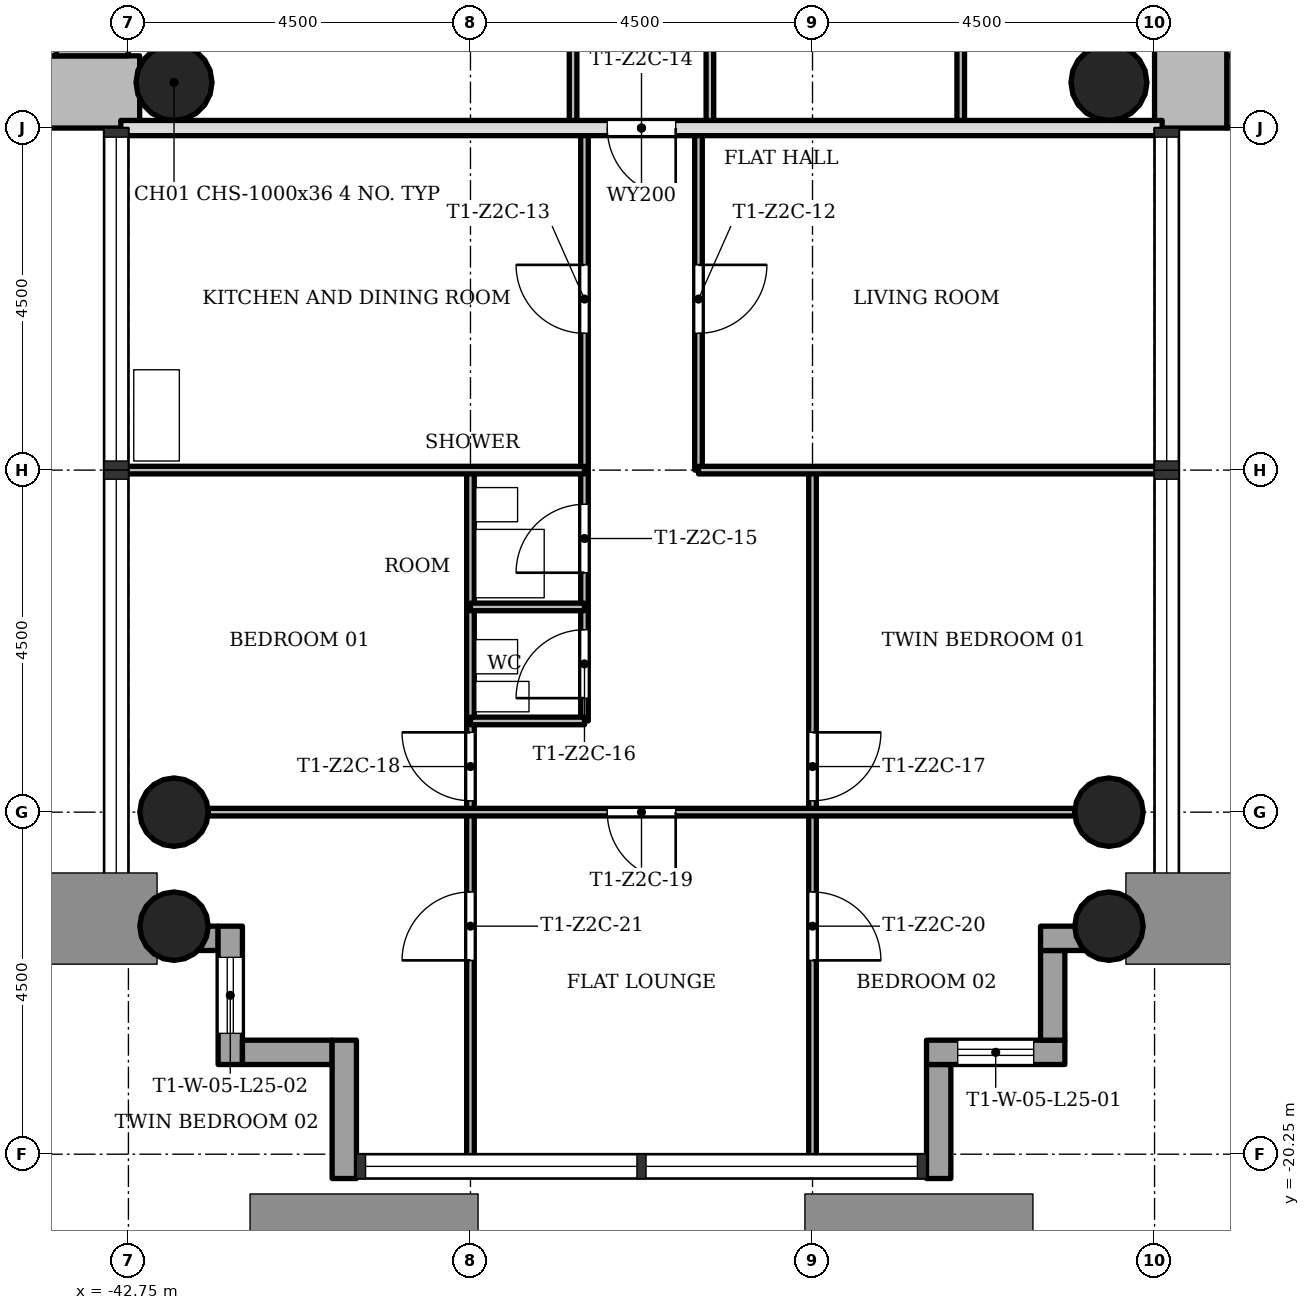
"""IFC4 building model, lengths in metres.
Left out: names, types, materials, properties, quantities, classifications, styles, units other than length and angle.
Written with IfcOpenShell. Run it as: python <this file> out.ifc"""

import sys

from ifc_helpers import new_model, si_unit, direction, frame, frame_2d, origin, origin_2d, place, context, subcontext, project, spatial, rectangle, hollow_circle, extrude, element, fill, save


model = new_model("IFC4")
c1 = context("Model", 3, precision=1e-05, world=origin(), true_north=direction((0.0, 1.0)))
c2 = subcontext(c1, "Body", "Model", "MODEL_VIEW")
j1 = project(units=[si_unit("LENGTHUNIT", "METRE"), si_unit("PLANEANGLEUNIT", "RADIAN")], contexts=[c1])
p1 = place(None, origin())
s1 = spatial("IfcSite", under=j1, at=p1, CompositionType="ELEMENT")
p2 = place(p1, origin())
s2 = spatial("IfcBuilding", under=s1, at=p2, CompositionType="ELEMENT")
p3 = place(p2, frame((0.0, 0.0, 93.6)))
s3 = spatial("IfcBuildingStorey", under=s2, at=p3, CompositionType="ELEMENT", Elevation=93.6)
p4 = place(p3, frame((-28.3, -6.275, 0.0), z_axis=(0.0, 0.0, 1.0), x_axis=(1.0, 0.0, 0.0)))
e1 = element("IfcWall", 1, at=p4, inside=s3, PredefinedType="SHEAR", context=c2, shape_type="SweptSolid", body=[
    extrude(rectangle(XDim=8.05, YDim=0.95, at=frame_2d((4.025, 0.0))), origin(), (0.0, 0.0, 1.0), 3.4),
])
p5 = place(p3, frame((-28.775, 5.8, 0.0), z_axis=(0.0, 0.0, 1.0), x_axis=(0.0, -1.0, 0.0)))
e2 = element("IfcWall", 2, at=p5, inside=s3, PredefinedType="SHEAR", context=c2, shape_type="SweptSolid", body=[
    extrude(rectangle(XDim=12.55, YDim=0.95, at=frame_2d((6.275, 0.0))), origin(), (0.0, 0.0, 1.0), 3.4),
])
p6 = place(p5, frame((4.9, 0.0, 0.0)))
e3 = element("IfcOpeningElement", 3, at=p6, cuts=e2, PredefinedType="OPENING", context=c2, shape_type="SweptSolid", body=[
    extrude(rectangle(XDim=1.8, YDim=2.1, at=frame_2d((0.9, 1.05))), frame((0.0, 0.485, 0.0), z_axis=(0.0, -1.0, 0.0), x_axis=(1.0, 0.0, 0.0)), (0.0, 0.0, 1.0), 0.97),
])
p7 = place(p3, frame((-51.298, -6.275, 0.0), z_axis=(0.0, 0.0, 1.0), x_axis=(1.0, 0.0, 0.0)))
e4 = element("IfcWall", 4, at=p7, inside=s3, PredefinedType="SHEAR", context=c2, shape_type="SweptSolid", body=[
    extrude(rectangle(XDim=8.696, YDim=0.95, at=frame_2d((4.348, 0.0))), origin(), (0.0, 0.0, 1.0), 3.4),
])
p8 = place(p3, frame((-43.225, -5.8, 0.0), z_axis=(0.0, 0.0, 1.0), x_axis=(0.0, 1.0, 0.0)))
e5 = element("IfcWall", 5, at=p8, inside=s3, PredefinedType="SHEAR", context=c2, shape_type="SweptSolid", body=[
    extrude(rectangle(XDim=12.55, YDim=0.95, at=frame_2d((6.275, 0.0))), origin(), (0.0, 0.0, 1.0), 3.4),
])
p9 = place(p8, frame((4.9, 0.0, 0.0)))
e6 = element("IfcOpeningElement", 6, at=p9, cuts=e5, PredefinedType="OPENING", context=c2, shape_type="SweptSolid", body=[
    extrude(rectangle(XDim=1.8, YDim=2.1, at=frame_2d((0.9, 1.05))), frame((0.0, 0.485, 0.0), z_axis=(0.0, -1.0, 0.0), x_axis=(1.0, 0.0, 0.0)), (0.0, 0.0, 1.0), 0.97),
])
for number, where, z_axis, x_axis in (
    (7, (-42.15, -15.75, 0.0), (0.0, 0.0, 1.0), (1.0, 0.0, 0.0)),
    (8, (-29.85, -15.75, 0.0), (0.0, 0.0, 1.0), (1.0, 0.0, 0.0)),
    (9, (-42.15, -17.25, 0.0), (0.0, 0.0, 1.0), (1.0, 0.0, 0.0)),
    (10, (-29.85, -17.25, 0.0), (0.0, 0.0, 1.0), (1.0, 0.0, 0.0)),
):
    element("IfcColumn", number, at=place(p3, frame(where, z_axis=z_axis, x_axis=x_axis)), inside=s3, PredefinedType="COLUMN", context=c2, shape_type="SweptSolid", body=[
        extrude(hollow_circle(Radius=0.45, WallThickness=0.032, at=origin_2d()), origin(), (0.0, 0.0, 1.0), 3.4),
    ])
for number, where, z_axis, x_axis in (
    (11, (-42.15, -6.15, 0.0), (0.0, 0.0, 1.0), (1.0, 0.0, 0.0)),
    (12, (-29.85, -6.15, 0.0), (0.0, 0.0, 1.0), (1.0, 0.0, 0.0)),
):
    element("IfcColumn", number, at=place(p3, frame(where, z_axis=z_axis, x_axis=x_axis)), inside=s3, PredefinedType="COLUMN", context=c2, shape_type="SweptSolid", body=[
        extrude(hollow_circle(Radius=0.5, WallThickness=0.036, at=origin_2d()), origin(), (0.0, 0.0, 1.0), 3.4),
    ])
p10 = place(p3, frame((-43.07, -17.41, -0.3), z_axis=(0.0, 0.0, 1.0), x_axis=(1.0, 0.0, 0.0)))
e13 = element("IfcWall", 13, at=p10, inside=s3, PredefinedType="STANDARD", context=c2, shape_type="SweptSolid", body=[
    extrude(rectangle(XDim=1.5, YDim=0.32, at=frame_2d((0.75, 0.0))), origin(), (0.0, 0.0, 1.0), 3.4),
])
p11 = place(p3, frame((-41.41, -17.25, -0.3), z_axis=(0.0, 0.0, 1.0), x_axis=(0.0, -1.0, 0.0)))
e14 = element("IfcWall", 14, at=p11, inside=s3, PredefinedType="STANDARD", context=c2, shape_type="SweptSolid", body=[
    extrude(rectangle(XDim=1.82, YDim=0.32, at=frame_2d((0.91, 0.0))), origin(), (0.0, 0.0, 1.0), 3.4),
])
p12 = place(p11, frame((0.41, 0.0, 1.2)))
e15 = element("IfcOpeningElement", 15, at=p12, cuts=e14, PredefinedType="OPENING", context=c2, shape_type="SweptSolid", body=[
    extrude(rectangle(XDim=1.0, YDim=1.5, at=frame_2d((0.5, 0.75))), frame((0.0, 0.17, 0.0), z_axis=(0.0, -1.0, 0.0), x_axis=(1.0, 0.0, 0.0)), (0.0, 0.0, 1.0), 0.34),
])
p13 = place(p3, frame((-41.25, -18.91, -0.3), z_axis=(0.0, 0.0, 1.0), x_axis=(1.0, 0.0, 0.0)))
e16 = element("IfcWall", 16, at=p13, inside=s3, PredefinedType="STANDARD", context=c2, shape_type="SweptSolid", body=[
    extrude(rectangle(XDim=1.18, YDim=0.32, at=frame_2d((0.59, 0.0))), origin(), (0.0, 0.0, 1.0), 3.4),
])
p14 = place(p3, frame((-39.91, -18.75, -0.3), z_axis=(0.0, 0.0, 1.0), x_axis=(0.0, -1.0, 0.0)))
e17 = element("IfcWall", 17, at=p14, inside=s3, PredefinedType="STANDARD", context=c2, shape_type="SweptSolid", body=[
    extrude(rectangle(XDim=1.82, YDim=0.32, at=frame_2d((0.91, 0.0))), origin(), (0.0, 0.0, 1.0), 3.4),
])
p15 = place(p3, frame((-32.09, -20.57, -0.3), z_axis=(0.0, 0.0, 1.0), x_axis=(0.0, 1.0, 0.0)))
e18 = element("IfcWall", 18, at=p15, inside=s3, PredefinedType="STANDARD", context=c2, shape_type="SweptSolid", body=[
    extrude(rectangle(XDim=1.5, YDim=0.32, at=frame_2d((0.75, 0.0))), origin(), (0.0, 0.0, 1.0), 3.4),
])
p16 = place(p3, frame((-32.25, -18.91, -0.3), z_axis=(0.0, 0.0, 1.0), x_axis=(1.0, 0.0, 0.0)))
e19 = element("IfcWall", 19, at=p16, inside=s3, PredefinedType="STANDARD", context=c2, shape_type="SweptSolid", body=[
    extrude(rectangle(XDim=1.82, YDim=0.32, at=frame_2d((0.91, 0.0))), origin(), (0.0, 0.0, 1.0), 3.4),
])
p17 = place(p16, frame((0.41, 0.0, 1.2)))
e20 = element("IfcOpeningElement", 20, at=p17, cuts=e19, PredefinedType="OPENING", context=c2, shape_type="SweptSolid", body=[
    extrude(rectangle(XDim=1.0, YDim=1.5, at=frame_2d((0.5, 0.75))), frame((0.0, 0.17, 0.0), z_axis=(0.0, -1.0, 0.0), x_axis=(1.0, 0.0, 0.0)), (0.0, 0.0, 1.0), 0.34),
])
p18 = place(p3, frame((-30.59, -18.75, -0.3), z_axis=(0.0, 0.0, 1.0), x_axis=(0.0, 1.0, 0.0)))
e21 = element("IfcWall", 21, at=p18, inside=s3, PredefinedType="STANDARD", context=c2, shape_type="SweptSolid", body=[
    extrude(rectangle(XDim=1.18, YDim=0.32, at=frame_2d((0.59, 0.0))), origin(), (0.0, 0.0, 1.0), 3.4),
])
p19 = place(p3, frame((-30.75, -17.41, -0.3), z_axis=(0.0, 0.0, 1.0), x_axis=(1.0, 0.0, 0.0)))
e22 = element("IfcWall", 22, at=p19, inside=s3, PredefinedType="STANDARD", context=c2, shape_type="SweptSolid", body=[
    extrude(rectangle(XDim=1.82, YDim=0.32, at=frame_2d((0.91, 0.0))), origin(), (0.0, 0.0, 1.0), 3.4),
])
p20 = place(p3, frame((-38.25, -20.35, 0.0), z_axis=(0.0, 0.0, 1.0), x_axis=(0.0, 1.0, 0.0)))
e23 = element("IfcWall", 23, at=p20, inside=s3, PredefinedType="PARTITIONING", context=c2, shape_type="SweptSolid", body=[
    extrude(rectangle(XDim=9.1, YDim=0.1, at=frame_2d((4.55, 0.0))), origin(), (0.0, 0.0, 1.0), 3.0),
])
p21 = place(p20, frame((4.75, 0.0, 0.0)))
e24 = element("IfcOpeningElement", 24, at=p21, cuts=e23, PredefinedType="OPENING", context=c2, shape_type="SweptSolid", body=[
    extrude(rectangle(XDim=0.9, YDim=2.1, at=frame_2d((0.45, 1.05))), frame((0.0, 0.06, 0.0), z_axis=(0.0, -1.0, 0.0), x_axis=(1.0, 0.0, 0.0)), (0.0, 0.0, 1.0), 0.12),
])
p22 = place(p20, frame((2.65, 0.0, 0.0)))
e25 = element("IfcOpeningElement", 25, at=p22, cuts=e23, PredefinedType="OPENING", context=c2, shape_type="SweptSolid", body=[
    extrude(rectangle(XDim=0.9, YDim=2.1, at=frame_2d((0.45, 1.05))), frame((0.0, 0.06, 0.0), z_axis=(0.0, -1.0, 0.0), x_axis=(1.0, 0.0, 0.0)), (0.0, 0.0, 1.0), 0.12),
])
p23 = place(p3, frame((-36.9, -6.75, 0.0), z_axis=(0.0, 0.0, 1.0), x_axis=(0.0, 1.0, 0.0)))
e26 = element("IfcWall", 26, at=p23, inside=s3, PredefinedType="PARTITIONING", context=c2, shape_type="SweptSolid", body=[
    extrude(rectangle(XDim=5.25, YDim=0.1, at=frame_2d((2.625, 0.0))), origin(), (0.0, 0.0, 1.0), 3.0),
])
p24 = place(p3, frame((-36.75, -14.55, 0.0), z_axis=(0.0, 0.0, 1.0), x_axis=(0.0, 1.0, 0.0)))
e27 = element("IfcWall", 27, at=p24, inside=s3, PredefinedType="PARTITIONING", context=c2, shape_type="SweptSolid", body=[
    extrude(rectangle(XDim=7.8, YDim=0.1, at=frame_2d((3.9, 0.0))), origin(), (0.0, 0.0, 1.0), 3.0),
])
p25 = place(p24, frame((5.1, 0.0, 0.0)))
e28 = element("IfcOpeningElement", 28, at=p25, cuts=e27, PredefinedType="OPENING", context=c2, shape_type="SweptSolid", body=[
    extrude(rectangle(XDim=0.9, YDim=2.1, at=frame_2d((0.45, 1.05))), frame((0.0, 0.06, 0.0), z_axis=(0.0, -1.0, 0.0), x_axis=(1.0, 0.0, 0.0)), (0.0, 0.0, 1.0), 0.12),
])
p26 = place(p24, frame((1.95, 0.0, 0.0)))
e29 = element("IfcOpeningElement", 29, at=p26, cuts=e27, PredefinedType="OPENING", context=c2, shape_type="SweptSolid", body=[
    extrude(rectangle(XDim=0.9, YDim=2.1, at=frame_2d((0.45, 1.05))), frame((0.0, 0.06, 0.0), z_axis=(0.0, -1.0, 0.0), x_axis=(1.0, 0.0, 0.0)), (0.0, 0.0, 1.0), 0.12),
])
p27 = place(p24, frame((0.3, 0.0, 0.0)))
e30 = element("IfcOpeningElement", 30, at=p27, cuts=e27, PredefinedType="OPENING", context=c2, shape_type="SweptSolid", body=[
    extrude(rectangle(XDim=0.9, YDim=2.1, at=frame_2d((0.45, 1.05))), frame((0.0, 0.06, 0.0), z_axis=(0.0, -1.0, 0.0), x_axis=(1.0, 0.0, 0.0)), (0.0, 0.0, 1.0), 0.12),
])
p28 = place(p3, frame((-35.25, -11.25, 0.0), z_axis=(0.0, 0.0, 1.0), x_axis=(0.0, 1.0, 0.0)))
e31 = element("IfcWall", 31, at=p28, inside=s3, PredefinedType="PARTITIONING", context=c2, shape_type="SweptSolid", body=[
    extrude(rectangle(XDim=4.5, YDim=0.1, at=frame_2d((2.25, 0.0))), origin(), (0.0, 0.0, 1.0), 3.0),
])
p29 = place(p28, frame((1.8, 0.0, 0.0)))
e32 = element("IfcOpeningElement", 32, at=p29, cuts=e31, PredefinedType="OPENING", context=c2, shape_type="SweptSolid", body=[
    extrude(rectangle(XDim=0.9, YDim=2.1, at=frame_2d((0.45, 1.05))), frame((0.0, 0.06, 0.0), z_axis=(0.0, -1.0, 0.0), x_axis=(1.0, 0.0, 0.0)), (0.0, 0.0, 1.0), 0.12),
])
p30 = place(p3, frame((-35.1, -6.75, 0.0), z_axis=(0.0, 0.0, 1.0), x_axis=(0.0, 1.0, 0.0)))
e33 = element("IfcWall", 33, at=p30, inside=s3, PredefinedType="PARTITIONING", context=c2, shape_type="SweptSolid", body=[
    extrude(rectangle(XDim=5.25, YDim=0.1, at=frame_2d((2.625, 0.0))), origin(), (0.0, 0.0, 1.0), 3.0),
])
p31 = place(p30, frame((2.175, 0.0, 0.0)))
e34 = element("IfcOpeningElement", 34, at=p31, cuts=e33, PredefinedType="OPENING", context=c2, shape_type="SweptSolid", body=[
    extrude(rectangle(XDim=0.9, YDim=2.1, at=frame_2d((0.45, 1.05))), frame((0.0, 0.06, 0.0), z_axis=(0.0, -1.0, 0.0), x_axis=(1.0, 0.0, 0.0)), (0.0, 0.0, 1.0), 0.12),
])
p32 = place(p3, frame((-33.75, -20.35, 0.0), z_axis=(0.0, 0.0, 1.0), x_axis=(0.0, 1.0, 0.0)))
e35 = element("IfcWall", 35, at=p32, inside=s3, PredefinedType="PARTITIONING", context=c2, shape_type="SweptSolid", body=[
    extrude(rectangle(XDim=9.1, YDim=0.1, at=frame_2d((4.55, 0.0))), origin(), (0.0, 0.0, 1.0), 3.0),
])
p33 = place(p32, frame((4.75, 0.0, 0.0)))
e36 = element("IfcOpeningElement", 36, at=p33, cuts=e35, PredefinedType="OPENING", context=c2, shape_type="SweptSolid", body=[
    extrude(rectangle(XDim=0.9, YDim=2.1, at=frame_2d((0.45, 1.05))), frame((0.0, 0.06, 0.0), z_axis=(0.0, -1.0, 0.0), x_axis=(1.0, 0.0, 0.0)), (0.0, 0.0, 1.0), 0.12),
])
p34 = place(p32, frame((2.65, 0.0, 0.0)))
e37 = element("IfcOpeningElement", 37, at=p34, cuts=e35, PredefinedType="OPENING", context=c2, shape_type="SweptSolid", body=[
    extrude(rectangle(XDim=0.9, YDim=2.1, at=frame_2d((0.45, 1.05))), frame((0.0, 0.06, 0.0), z_axis=(0.0, -1.0, 0.0), x_axis=(1.0, 0.0, 0.0)), (0.0, 0.0, 1.0), 0.12),
])
p35 = place(p3, frame((-31.8, -6.75, 0.0), z_axis=(0.0, 0.0, 1.0), x_axis=(0.0, 1.0, 0.0)))
e38 = element("IfcWall", 38, at=p35, inside=s3, PredefinedType="PARTITIONING", context=c2, shape_type="SweptSolid", body=[
    extrude(rectangle(XDim=5.25, YDim=0.1, at=frame_2d((2.625, 0.0))), origin(), (0.0, 0.0, 1.0), 3.0),
])
p36 = place(p3, frame((-41.7, -15.75, 0.0), z_axis=(0.0, 0.0, 1.0), x_axis=(1.0, 0.0, 0.0)))
e39 = element("IfcWall", 39, at=p36, inside=s3, PredefinedType="PARTITIONING", context=c2, shape_type="SweptSolid", body=[
    extrude(rectangle(XDim=11.4, YDim=0.1, at=frame_2d((5.7, 0.0))), origin(), (0.0, 0.0, 1.0), 3.0),
])
p37 = place(p36, frame((5.25, 0.0, 0.0)))
e40 = element("IfcOpeningElement", 40, at=p37, cuts=e39, PredefinedType="OPENING", context=c2, shape_type="SweptSolid", body=[
    extrude(rectangle(XDim=0.9, YDim=2.1, at=frame_2d((0.45, 1.05))), frame((0.0, 0.06, 0.0), z_axis=(0.0, -1.0, 0.0), x_axis=(1.0, 0.0, 0.0)), (0.0, 0.0, 1.0), 0.12),
])
for number, where, z_axis, x_axis in (
    (41, (-38.25, -14.55, 0.0), (0.0, 0.0, 1.0), (1.0, 0.0, 0.0)),
    (42, (-38.25, -13.05, 0.0), (0.0, 0.0, 1.0), (1.0, 0.0, 0.0)),
):
    element("IfcWall", number, at=place(p3, frame(where, z_axis=z_axis, x_axis=x_axis)), inside=s3, PredefinedType="PARTITIONING", context=c2, shape_type="SweptSolid", body=[
        extrude(rectangle(XDim=1.5, YDim=0.1, at=frame_2d((0.75, 0.0))), origin(), (0.0, 0.0, 1.0), 3.0),
    ])
for number, where, z_axis, x_axis in (
    (43, (-42.85, -11.25, 0.0), (0.0, 0.0, 1.0), (1.0, 0.0, 0.0)),
    (44, (-35.25, -11.25, 0.0), (0.0, 0.0, 1.0), (1.0, 0.0, 0.0)),
):
    element("IfcWall", number, at=place(p3, frame(where, z_axis=z_axis, x_axis=x_axis)), inside=s3, PredefinedType="PARTITIONING", context=c2, shape_type="SweptSolid", body=[
        extrude(rectangle(XDim=6.1, YDim=0.1, at=frame_2d((3.05, 0.0))), origin(), (0.0, 0.0, 1.0), 3.0),
    ])
p38 = place(p3, frame((-42.85, -6.75, 0.0), z_axis=(0.0, 0.0, 1.0), x_axis=(1.0, 0.0, 0.0)))
e45 = element("IfcWall", 45, at=p38, inside=s3, PredefinedType="SOLIDWALL", context=c2, shape_type="SweptSolid", body=[
    extrude(rectangle(XDim=13.7, YDim=0.2, at=frame_2d((6.85, 0.0))), origin(), (0.0, 0.0, 1.0), 3.0),
])
p39 = place(p38, frame((6.4, 0.0, 0.0)))
e46 = element("IfcOpeningElement", 46, at=p39, cuts=e45, PredefinedType="OPENING", context=c2, shape_type="SweptSolid", body=[
    extrude(rectangle(XDim=0.9, YDim=2.1, at=frame_2d((0.45, 1.05))), frame((0.0, 0.11, 0.0), z_axis=(0.0, -1.0, 0.0), x_axis=(1.0, 0.0, 0.0)), (0.0, 0.0, 1.0), 0.22),
])
p40 = place(p3, frame((-43.825, -1.9, 0.0), z_axis=(0.0, 0.0, 1.0), x_axis=(0.0, -1.0, 0.0)))
e47 = element("IfcWall", 47, at=p40, inside=s3, PredefinedType="SHEAR", context=c2, shape_type="SweptSolid", body=[
    extrude(rectangle(XDim=3.9, YDim=0.25, at=frame_2d((1.95, 0.0))), origin(), (0.0, 0.0, 1.0), 3.4),
])
p41 = place(p29, origin())
e48 = element("IfcDoor", 48, at=p41, inside=s3, OperationType="SINGLE_SWING_RIGHT", PredefinedType="DOOR", context=c2, shape_type="SweptSolid", body=[
    extrude(rectangle(XDim=0.9, YDim=2.1, at=frame_2d((0.45, 1.05))), frame((0.0, 0.025, 0.0), z_axis=(0.0, -1.0, 0.0), x_axis=(1.0, 0.0, 0.0)), (0.0, 0.0, 1.0), 0.05),
])
fill(e32, e48)
p42 = place(p25, origin())
e49 = element("IfcDoor", 49, at=p42, inside=s3, OperationType="SINGLE_SWING_LEFT", PredefinedType="DOOR", context=c2, shape_type="SweptSolid", body=[
    extrude(rectangle(XDim=0.9, YDim=2.1, at=frame_2d((0.45, 1.05))), frame((0.0, 0.025, 0.0), z_axis=(0.0, -1.0, 0.0), x_axis=(1.0, 0.0, 0.0)), (0.0, 0.0, 1.0), 0.05),
])
fill(e28, e49)
p43 = place(p39, origin())
e50 = element("IfcDoor", 50, at=p43, inside=s3, OperationType="SINGLE_SWING_RIGHT", PredefinedType="DOOR", context=c2, shape_type="SweptSolid", body=[
    extrude(rectangle(XDim=0.9, YDim=2.1, at=frame_2d((0.45, 1.05))), frame((0.0, 0.025, 0.0), z_axis=(0.0, -1.0, 0.0), x_axis=(1.0, 0.0, 0.0)), (0.0, 0.0, 1.0), 0.05),
])
fill(e46, e50)
p44 = place(p26, origin())
e51 = element("IfcDoor", 51, at=p44, inside=s3, OperationType="SINGLE_SWING_RIGHT", PredefinedType="DOOR", context=c2, shape_type="SweptSolid", body=[
    extrude(rectangle(XDim=0.9, YDim=2.1, at=frame_2d((0.45, 1.05))), frame((0.0, 0.025, 0.0), z_axis=(0.0, -1.0, 0.0), x_axis=(1.0, 0.0, 0.0)), (0.0, 0.0, 1.0), 0.05),
])
fill(e29, e51)
p45 = place(p27, origin())
e52 = element("IfcDoor", 52, at=p45, inside=s3, OperationType="SINGLE_SWING_RIGHT", PredefinedType="DOOR", context=c2, shape_type="SweptSolid", body=[
    extrude(rectangle(XDim=0.9, YDim=2.1, at=frame_2d((0.45, 1.05))), frame((0.0, 0.025, 0.0), z_axis=(0.0, -1.0, 0.0), x_axis=(1.0, 0.0, 0.0)), (0.0, 0.0, 1.0), 0.05),
])
fill(e30, e52)
p46 = place(p33, origin())
e53 = element("IfcDoor", 53, at=p46, inside=s3, OperationType="SINGLE_SWING_RIGHT", PredefinedType="DOOR", context=c2, shape_type="SweptSolid", body=[
    extrude(rectangle(XDim=0.9, YDim=2.1, at=frame_2d((0.45, 1.05))), frame((0.0, 0.025, 0.0), z_axis=(0.0, -1.0, 0.0), x_axis=(1.0, 0.0, 0.0)), (0.0, 0.0, 1.0), 0.05),
])
fill(e36, e53)
p47 = place(p21, origin())
e54 = element("IfcDoor", 54, at=p47, inside=s3, OperationType="SINGLE_SWING_LEFT", PredefinedType="DOOR", context=c2, shape_type="SweptSolid", body=[
    extrude(rectangle(XDim=0.9, YDim=2.1, at=frame_2d((0.45, 1.05))), frame((0.0, 0.025, 0.0), z_axis=(0.0, -1.0, 0.0), x_axis=(1.0, 0.0, 0.0)), (0.0, 0.0, 1.0), 0.05),
])
fill(e24, e54)
p48 = place(p37, origin())
e55 = element("IfcDoor", 55, at=p48, inside=s3, OperationType="SINGLE_SWING_RIGHT", PredefinedType="DOOR", context=c2, shape_type="SweptSolid", body=[
    extrude(rectangle(XDim=0.9, YDim=2.1, at=frame_2d((0.45, 1.05))), frame((0.0, 0.025, 0.0), z_axis=(0.0, -1.0, 0.0), x_axis=(1.0, 0.0, 0.0)), (0.0, 0.0, 1.0), 0.05),
])
fill(e40, e55)
p49 = place(p34, origin())
e56 = element("IfcDoor", 56, at=p49, inside=s3, OperationType="SINGLE_SWING_LEFT", PredefinedType="DOOR", context=c2, shape_type="SweptSolid", body=[
    extrude(rectangle(XDim=0.9, YDim=2.1, at=frame_2d((0.45, 1.05))), frame((0.0, 0.025, 0.0), z_axis=(0.0, -1.0, 0.0), x_axis=(1.0, 0.0, 0.0)), (0.0, 0.0, 1.0), 0.05),
])
fill(e37, e56)
p50 = place(p22, origin())
e57 = element("IfcDoor", 57, at=p50, inside=s3, OperationType="SINGLE_SWING_RIGHT", PredefinedType="DOOR", context=c2, shape_type="SweptSolid", body=[
    extrude(rectangle(XDim=0.9, YDim=2.1, at=frame_2d((0.45, 1.05))), frame((0.0, 0.025, 0.0), z_axis=(0.0, -1.0, 0.0), x_axis=(1.0, 0.0, 0.0)), (0.0, 0.0, 1.0), 0.05),
])
fill(e25, e57)
p51 = place(p17, origin())
e58 = element("IfcWindow", 58, at=p51, inside=s3, PartitioningType="SINGLE_PANEL", PredefinedType="WINDOW", context=c2, shape_type="SweptSolid", body=[
    extrude(rectangle(XDim=1.0, YDim=1.5, at=frame_2d((0.5, 0.75))), frame((0.0, 0.03, 0.0), z_axis=(0.0, -1.0, 0.0), x_axis=(1.0, 0.0, 0.0)), (0.0, 0.0, 1.0), 0.06),
])
fill(e20, e58)
p52 = place(p12, origin())
e59 = element("IfcWindow", 59, at=p52, inside=s3, PartitioningType="SINGLE_PANEL", PredefinedType="WINDOW", context=c2, shape_type="SweptSolid", body=[
    extrude(rectangle(XDim=1.0, YDim=1.5, at=frame_2d((0.5, 0.75))), frame((0.0, 0.03, 0.0), z_axis=(0.0, -1.0, 0.0), x_axis=(1.0, 0.0, 0.0)), (0.0, 0.0, 1.0), 0.06),
])
fill(e15, e59)
save(model, sys.argv[1])
